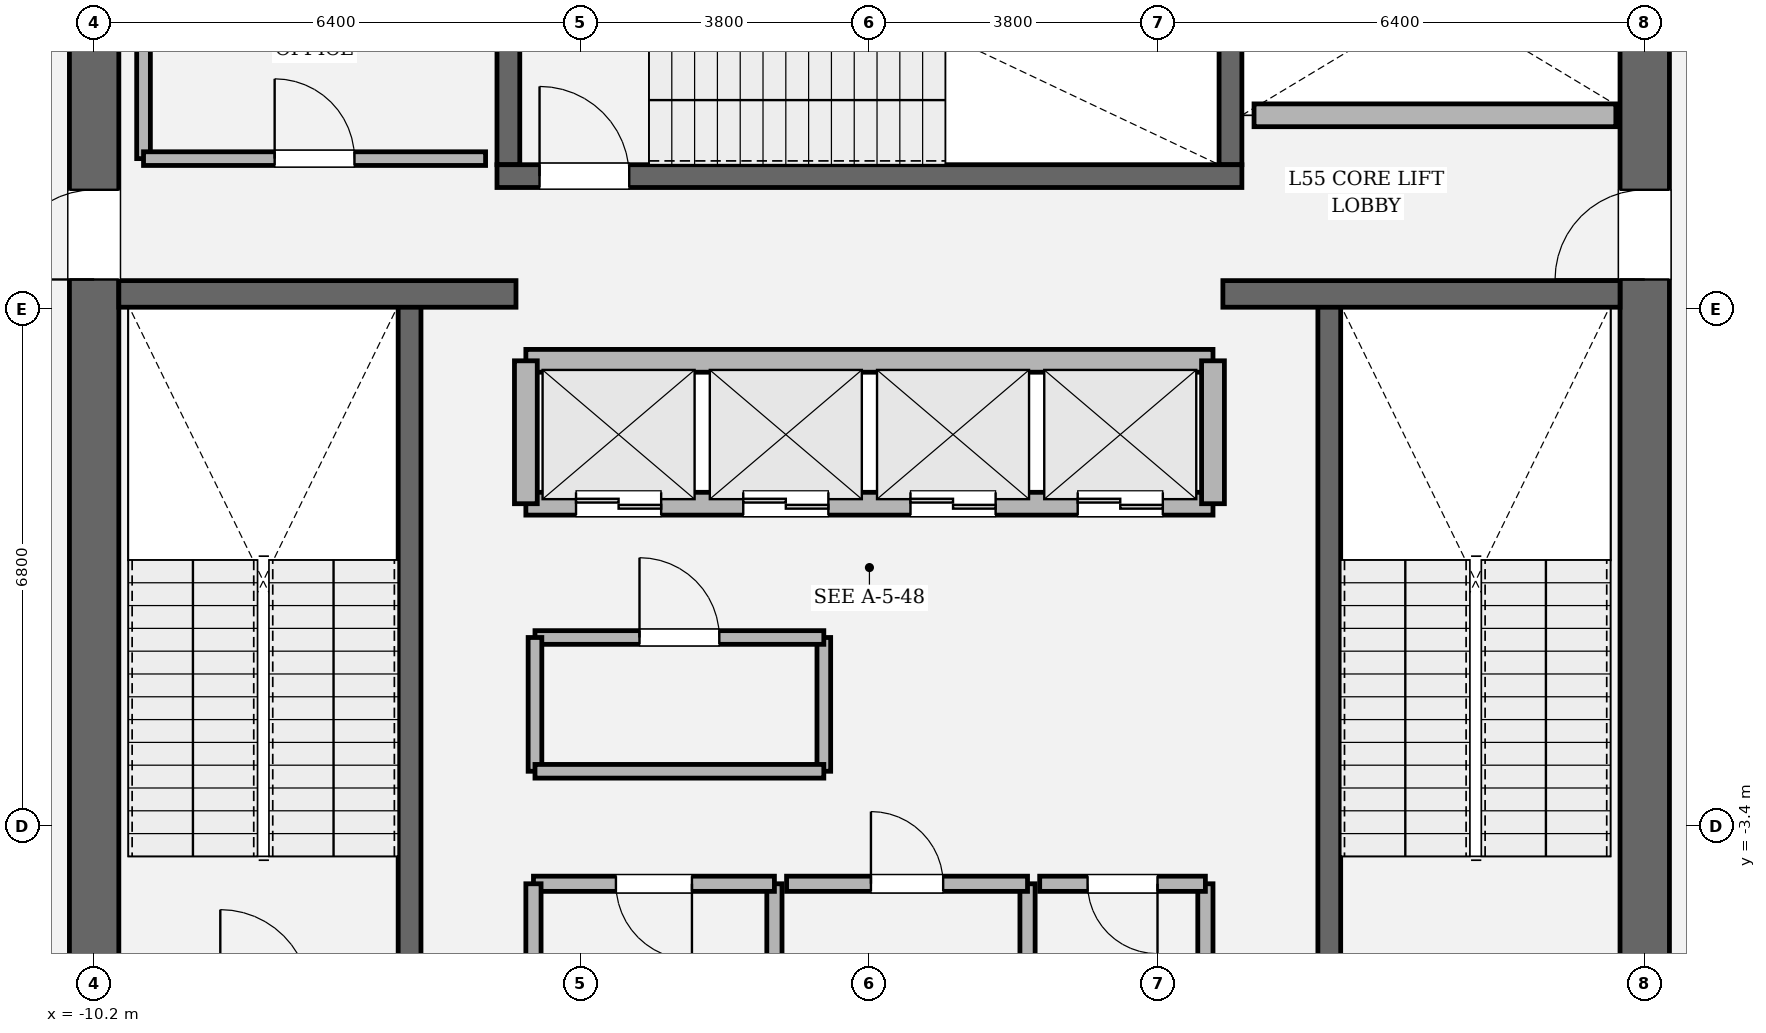
"""IFC4 building model, lengths in metres.
Left out: names, types, materials, properties, quantities, classifications, styles, units other than length and angle.
Written with IfcOpenShell. Run it as: python <this file> out.ifc"""

import sys

from ifc_helpers import new_model, si_unit, direction, frame, frame_2d, origin, place, context, subcontext, project, spatial, rectangle, extrude, element, fill, save


model = new_model("IFC4")
c1 = context("Model", 3, precision=1e-05, world=origin(), true_north=direction((0.0, 1.0)))
c2 = subcontext(c1, "Body", "Model", "MODEL_VIEW")
j1 = project(units=[si_unit("LENGTHUNIT", "METRE"), si_unit("PLANEANGLEUNIT", "RADIAN")], contexts=[c1])
p1 = place(None, origin())
s1 = spatial("IfcSite", under=j1, at=p1, CompositionType="ELEMENT")
p2 = place(p1, origin())
s2 = spatial("IfcBuilding", under=s1, at=p2, CompositionType="ELEMENT")
p3 = place(p2, frame((0.0, 0.0, 232.95)))
s3 = spatial("IfcBuildingStorey", under=s2, at=p3, CompositionType="ELEMENT", Elevation=232.95)
p4 = place(p3, frame((-10.2, -8.875, 0.0), z_axis=(0.0, 0.0, 1.0), x_axis=(0.0, 1.0, 0.0)))
e1 = element("IfcWall", 1, at=p4, inside=s3, PredefinedType="SHEAR", context=c2, shape_type="SweptSolid", body=[
    extrude(rectangle(XDim=17.75, YDim=0.65, at=frame_2d((8.875, 0.0))), origin(), (0.0, 0.0, 1.0), 4.05),
])
p5 = place(p4, frame((12.665, 0.0, 0.0)))
e2 = element("IfcOpeningElement", 2, at=p5, cuts=e1, PredefinedType="OPENING", context=c2, shape_type="SweptSolid", body=[
    extrude(rectangle(XDim=1.18, YDim=2.2, at=frame_2d((0.59, 1.1))), frame((0.0, 0.335, 0.0), z_axis=(0.0, -1.0, 0.0), x_axis=(1.0, 0.0, 0.0)), (0.0, 0.0, 1.0), 0.67),
])
p6 = place(p3, frame((10.2, 8.875, 0.0), z_axis=(0.0, 0.0, 1.0), x_axis=(0.0, -1.0, 0.0)))
e3 = element("IfcWall", 3, at=p6, inside=s3, PredefinedType="SHEAR", context=c2, shape_type="SweptSolid", body=[
    extrude(rectangle(XDim=17.75, YDim=0.65, at=frame_2d((8.875, 0.0))), origin(), (0.0, 0.0, 1.0), 4.05),
])
p7 = place(p6, frame((3.905, 0.0, 0.0)))
e4 = element("IfcOpeningElement", 4, at=p7, cuts=e3, PredefinedType="OPENING", context=c2, shape_type="SweptSolid", body=[
    extrude(rectangle(XDim=1.18, YDim=2.2, at=frame_2d((0.59, 1.1))), frame((0.0, 0.335, 0.0), z_axis=(0.0, -1.0, 0.0), x_axis=(1.0, 0.0, 0.0)), (0.0, 0.0, 1.0), 0.67),
])
for number, where, z_axis, x_axis in (
    (5, (-6.05, -5.5, 0.0), (0.0, 0.0, 1.0), (0.0, 1.0, 0.0)),
    (6, (6.05, 3.45, 0.0), (0.0, 0.0, 1.0), (0.0, -1.0, 0.0)),
):
    element("IfcWall", number, at=place(p3, frame(where, z_axis=z_axis, x_axis=x_axis)), inside=s3, PredefinedType="SOLIDWALL", context=c2, shape_type="SweptSolid", body=[
        extrude(rectangle(XDim=8.95, YDim=0.3, at=frame_2d((4.475, 0.0))), origin(), (0.0, 0.0, 1.0), 4.05),
    ])
for number, where, z_axis, x_axis in (
    (7, (-4.75, 5.3, 0.0), (0.0, 0.0, 1.0), (0.0, 1.0, 0.0)),
    (8, (4.75, 8.875, 0.0), (0.0, 0.0, 1.0), (0.0, -1.0, 0.0)),
):
    element("IfcWall", number, at=place(p3, frame(where, z_axis=z_axis, x_axis=x_axis)), inside=s3, PredefinedType="SOLIDWALL", context=c2, shape_type="SweptSolid", body=[
        extrude(rectangle(XDim=3.575, YDim=0.3, at=frame_2d((1.788, 0.0))), origin(), (0.0, 0.0, 1.0), 4.05),
    ])
p8 = place(p3, frame((-4.9, 5.15, 0.0), z_axis=(0.0, 0.0, 1.0), x_axis=(1.0, 0.0, 0.0)))
e9 = element("IfcWall", 9, at=p8, inside=s3, PredefinedType="SOLIDWALL", context=c2, shape_type="SweptSolid", body=[
    extrude(rectangle(XDim=9.8, YDim=0.3, at=frame_2d((4.9, 0.0))), origin(), (0.0, 0.0, 1.0), 4.05),
])
p9 = place(p8, frame((0.56, 0.0, 0.0)))
e10 = element("IfcOpeningElement", 10, at=p9, cuts=e9, PredefinedType="OPENING", context=c2, shape_type="SweptSolid", body=[
    extrude(rectangle(XDim=1.18, YDim=2.2, at=frame_2d((0.59, 1.1))), frame((0.0, 0.16, 0.0), z_axis=(0.0, -1.0, 0.0), x_axis=(1.0, 0.0, 0.0)), (0.0, 0.0, 1.0), 0.32),
])
for number, where, z_axis, x_axis in (
    (11, (-9.875, 3.6, 0.0), (0.0, 0.0, 1.0), (1.0, 0.0, 0.0)),
    (12, (4.65, 3.6, 0.0), (0.0, 0.0, 1.0), (1.0, 0.0, 0.0)),
):
    element("IfcWall", number, at=place(p3, frame(where, z_axis=z_axis, x_axis=x_axis)), inside=s3, PredefinedType="SOLIDWALL", context=c2, shape_type="SweptSolid", body=[
        extrude(rectangle(XDim=5.225, YDim=0.35, at=frame_2d((2.613, 0.0))), origin(), (0.0, 0.0, 1.0), 4.05),
    ])
p10 = place(p3, frame((-4.52, 0.84, 0.0), z_axis=(0.0, 0.0, 1.0), x_axis=(1.0, 0.0, 0.0)))
e13 = element("IfcWall", 13, at=p10, inside=s3, PredefinedType="SOLIDWALL", context=c2, shape_type="SweptSolid", body=[
    extrude(rectangle(XDim=9.04, YDim=0.3, at=frame_2d((4.52, 0.0))), origin(), (0.0, 0.0, 1.0), 3.73),
])
p11 = place(p10, frame((0.66, 0.0, 0.0)))
e14 = element("IfcOpeningElement", 14, at=p11, cuts=e13, PredefinedType="OPENING", context=c2, shape_type="SweptSolid", body=[
    extrude(rectangle(XDim=1.12, YDim=2.25, at=frame_2d((0.56, 1.125))), frame((0.0, 0.16, 0.0), z_axis=(0.0, -1.0, 0.0), x_axis=(1.0, 0.0, 0.0)), (0.0, 0.0, 1.0), 0.32),
])
p12 = place(p10, frame((2.86, 0.0, 0.0)))
e15 = element("IfcOpeningElement", 15, at=p12, cuts=e13, PredefinedType="OPENING", context=c2, shape_type="SweptSolid", body=[
    extrude(rectangle(XDim=1.12, YDim=2.25, at=frame_2d((0.56, 1.125))), frame((0.0, 0.16, 0.0), z_axis=(0.0, -1.0, 0.0), x_axis=(1.0, 0.0, 0.0)), (0.0, 0.0, 1.0), 0.32),
])
p13 = place(p10, frame((5.06, 0.0, 0.0)))
e16 = element("IfcOpeningElement", 16, at=p13, cuts=e13, PredefinedType="OPENING", context=c2, shape_type="SweptSolid", body=[
    extrude(rectangle(XDim=1.12, YDim=2.25, at=frame_2d((0.56, 1.125))), frame((0.0, 0.16, 0.0), z_axis=(0.0, -1.0, 0.0), x_axis=(1.0, 0.0, 0.0)), (0.0, 0.0, 1.0), 0.32),
])
p14 = place(p10, frame((7.26, 0.0, 0.0)))
e17 = element("IfcOpeningElement", 17, at=p14, cuts=e13, PredefinedType="OPENING", context=c2, shape_type="SweptSolid", body=[
    extrude(rectangle(XDim=1.12, YDim=2.25, at=frame_2d((0.56, 1.125))), frame((0.0, 0.16, 0.0), z_axis=(0.0, -1.0, 0.0), x_axis=(1.0, 0.0, 0.0)), (0.0, 0.0, 1.0), 0.32),
])
p15 = place(p3, frame((-4.52, 2.72, 0.0), z_axis=(0.0, 0.0, 1.0), x_axis=(1.0, 0.0, 0.0)))
e18 = element("IfcWall", 18, at=p15, inside=s3, PredefinedType="SOLIDWALL", context=c2, shape_type="SweptSolid", body=[
    extrude(rectangle(XDim=9.04, YDim=0.3, at=frame_2d((4.52, 0.0))), origin(), (0.0, 0.0, 1.0), 3.73),
])
for number, where, z_axis, x_axis in (
    (19, (-4.52, 0.84, 0.0), (0.0, 0.0, 1.0), (0.0, 1.0, 0.0)),
    (20, (4.52, 0.84, 0.0), (0.0, 0.0, 1.0), (0.0, 1.0, 0.0)),
):
    element("IfcWall", number, at=place(p3, frame(where, z_axis=z_axis, x_axis=x_axis)), inside=s3, PredefinedType="SOLIDWALL", context=c2, shape_type="SweptSolid", body=[
        extrude(rectangle(XDim=1.88, YDim=0.3, at=frame_2d((0.94, 0.0))), origin(), (0.0, 0.0, 1.0), 3.73),
    ])
p16 = place(p3, frame((5.06, 5.95, 0.0), z_axis=(0.0, 0.0, 1.0), x_axis=(1.0, 0.0, 0.0)))
e21 = element("IfcWall", 21, at=p16, inside=s3, PredefinedType="SOLIDWALL", context=c2, shape_type="SweptSolid", body=[
    extrude(rectangle(XDim=4.76, YDim=0.3, at=frame_2d((2.38, 0.0))), origin(), (0.0, 0.0, 1.0), 3.73),
])
p17 = place(p3, frame((-1.25, -5.9, 0.0), z_axis=(0.0, 0.0, 1.0), x_axis=(0.0, 1.0, 0.0)))
e22 = element("IfcWall", 22, at=p17, inside=s3, PredefinedType="SOLIDWALL", context=c2, shape_type="SweptSolid", body=[
    extrude(rectangle(XDim=1.74, YDim=0.2, at=frame_2d((0.87, 0.0))), origin(), (0.0, 0.0, 1.0), 3.73),
])
p18 = place(p3, frame((-1.25, -4.16, 0.0), z_axis=(0.0, 0.0, 1.0), x_axis=(-1.0, 0.0, 0.0)))
e23 = element("IfcWall", 23, at=p18, inside=s3, PredefinedType="SOLIDWALL", context=c2, shape_type="SweptSolid", body=[
    extrude(rectangle(XDim=3.17, YDim=0.2, at=frame_2d((1.585, 0.0))), origin(), (0.0, 0.0, 1.0), 3.73),
])
p19 = place(p18, frame((1.085, 0.0, 0.0)))
e24 = element("IfcOpeningElement", 24, at=p19, cuts=e23, PredefinedType="OPENING", context=c2, shape_type="SweptSolid", body=[
    extrude(rectangle(XDim=1.0, YDim=2.15, at=frame_2d((0.5, 1.075))), frame((0.0, 0.11, 0.0), z_axis=(0.0, -1.0, 0.0), x_axis=(1.0, 0.0, 0.0)), (0.0, 0.0, 1.0), 0.22),
])
for number, where, z_axis, x_axis in (
    (25, (-4.42, -4.16, 0.0), (0.0, 0.0, 1.0), (0.0, -1.0, 0.0)),
    (26, (2.08, -5.9, 0.0), (0.0, 0.0, 1.0), (0.0, 1.0, 0.0)),
):
    element("IfcWall", number, at=place(p3, frame(where, z_axis=z_axis, x_axis=x_axis)), inside=s3, PredefinedType="SOLIDWALL", context=c2, shape_type="SweptSolid", body=[
        extrude(rectangle(XDim=1.74, YDim=0.2, at=frame_2d((0.87, 0.0))), origin(), (0.0, 0.0, 1.0), 3.73),
    ])
p20 = place(p3, frame((2.08, -4.16, 0.0), z_axis=(0.0, 0.0, 1.0), x_axis=(-1.0, 0.0, 0.0)))
e27 = element("IfcWall", 27, at=p20, inside=s3, PredefinedType="SOLIDWALL", context=c2, shape_type="SweptSolid", body=[
    extrude(rectangle(XDim=3.17, YDim=0.2, at=frame_2d((1.585, 0.0))), origin(), (0.0, 0.0, 1.0), 3.73),
])
p21 = place(p20, frame((1.11, 0.0, 0.0)))
e28 = element("IfcOpeningElement", 28, at=p21, cuts=e27, PredefinedType="OPENING", context=c2, shape_type="SweptSolid", body=[
    extrude(rectangle(XDim=0.95, YDim=2.15, at=frame_2d((0.475, 1.075))), frame((0.0, 0.11, 0.0), z_axis=(0.0, -1.0, 0.0), x_axis=(1.0, 0.0, 0.0)), (0.0, 0.0, 1.0), 0.22),
])
p22 = place(p3, frame((4.42, -5.9, 0.0), z_axis=(0.0, 0.0, 1.0), x_axis=(0.0, 1.0, 0.0)))
e29 = element("IfcWall", 29, at=p22, inside=s3, PredefinedType="SOLIDWALL", context=c2, shape_type="SweptSolid", body=[
    extrude(rectangle(XDim=1.74, YDim=0.2, at=frame_2d((0.87, 0.0))), origin(), (0.0, 0.0, 1.0), 3.73),
])
p23 = place(p3, frame((4.42, -4.16, 0.0), z_axis=(0.0, 0.0, 1.0), x_axis=(-1.0, 0.0, 0.0)))
e30 = element("IfcWall", 30, at=p23, inside=s3, PredefinedType="SOLIDWALL", context=c2, shape_type="SweptSolid", body=[
    extrude(rectangle(XDim=2.18, YDim=0.2, at=frame_2d((1.09, 0.0))), origin(), (0.0, 0.0, 1.0), 3.73),
])
p24 = place(p23, frame((0.63, 0.0, 0.0)))
e31 = element("IfcOpeningElement", 31, at=p24, cuts=e30, PredefinedType="OPENING", context=c2, shape_type="SweptSolid", body=[
    extrude(rectangle(XDim=0.92, YDim=2.1, at=frame_2d((0.46, 1.05))), frame((0.0, 0.11, 0.0), z_axis=(0.0, -1.0, 0.0), x_axis=(1.0, 0.0, 0.0)), (0.0, 0.0, 1.0), 0.22),
])
p25 = place(p3, frame((-0.6, -2.68, 0.0), z_axis=(0.0, 0.0, 1.0), x_axis=(0.0, 1.0, 0.0)))
e32 = element("IfcWall", 32, at=p25, inside=s3, PredefinedType="PARTITIONING", context=c2, shape_type="SweptSolid", body=[
    extrude(rectangle(XDim=1.76, YDim=0.18, at=frame_2d((0.88, 0.0))), origin(), (0.0, 0.0, 1.0), 3.73),
])
p26 = place(p3, frame((-0.6, -0.92, 0.0), z_axis=(0.0, 0.0, 1.0), x_axis=(-1.0, 0.0, 0.0)))
e33 = element("IfcWall", 33, at=p26, inside=s3, PredefinedType="PARTITIONING", context=c2, shape_type="SweptSolid", body=[
    extrude(rectangle(XDim=3.8, YDim=0.18, at=frame_2d((1.9, 0.0))), origin(), (0.0, 0.0, 1.0), 3.73),
])
p27 = place(p26, frame((1.375, 0.0, 0.0)))
e34 = element("IfcOpeningElement", 34, at=p27, cuts=e33, PredefinedType="OPENING", context=c2, shape_type="SweptSolid", body=[
    extrude(rectangle(XDim=1.05, YDim=2.2, at=frame_2d((0.525, 1.1))), frame((0.0, 0.1, 0.0), z_axis=(0.0, -1.0, 0.0), x_axis=(1.0, 0.0, 0.0)), (0.0, 0.0, 1.0), 0.2),
])
p28 = place(p3, frame((-4.4, -0.92, 0.0), z_axis=(0.0, 0.0, 1.0), x_axis=(0.0, -1.0, 0.0)))
e35 = element("IfcWall", 35, at=p28, inside=s3, PredefinedType="PARTITIONING", context=c2, shape_type="SweptSolid", body=[
    extrude(rectangle(XDim=1.76, YDim=0.18, at=frame_2d((0.88, 0.0))), origin(), (0.0, 0.0, 1.0), 3.73),
])
p29 = place(p3, frame((-4.4, -2.68, 0.0), z_axis=(0.0, 0.0, 1.0), x_axis=(1.0, 0.0, 0.0)))
e36 = element("IfcWall", 36, at=p29, inside=s3, PredefinedType="PARTITIONING", context=c2, shape_type="SweptSolid", body=[
    extrude(rectangle(XDim=3.8, YDim=0.18, at=frame_2d((1.9, 0.0))), origin(), (0.0, 0.0, 1.0), 3.73),
])
p30 = place(p3, frame((-9.55, 8.65, 0.0), z_axis=(0.0, 0.0, 1.0), x_axis=(0.0, -1.0, 0.0)))
e37 = element("IfcWall", 37, at=p30, inside=s3, PredefinedType="PARTITIONING", context=c2, shape_type="SweptSolid", body=[
    extrude(rectangle(XDim=3.27, YDim=0.18, at=frame_2d((1.635, 0.0))), origin(), (0.0, 0.0, 1.0), 3.73),
])
p31 = place(p3, frame((-9.55, 5.38, 0.0), z_axis=(0.0, 0.0, 1.0), x_axis=(1.0, 0.0, 0.0)))
e38 = element("IfcWall", 38, at=p31, inside=s3, PredefinedType="PARTITIONING", context=c2, shape_type="SweptSolid", body=[
    extrude(rectangle(XDim=4.5, YDim=0.18, at=frame_2d((2.25, 0.0))), origin(), (0.0, 0.0, 1.0), 3.73),
])
p32 = place(p31, frame((1.725, 0.0, 0.0)))
e39 = element("IfcOpeningElement", 39, at=p32, cuts=e38, PredefinedType="OPENING", context=c2, shape_type="SweptSolid", body=[
    extrude(rectangle(XDim=1.05, YDim=2.2, at=frame_2d((0.525, 1.1))), frame((0.0, 0.1, 0.0), z_axis=(0.0, -1.0, 0.0), x_axis=(1.0, 0.0, 0.0)), (0.0, 0.0, 1.0), 0.2),
])
p33 = place(p9, origin())
e40 = element("IfcDoor", 40, at=p33, inside=s3, OperationType="SINGLE_SWING_LEFT", PredefinedType="DOOR", context=c2, shape_type="SweptSolid", body=[
    extrude(rectangle(XDim=1.18, YDim=2.2, at=frame_2d((0.59, 1.1))), frame((0.0, 0.025, 0.0), z_axis=(0.0, -1.0, 0.0), x_axis=(1.0, 0.0, 0.0)), (0.0, 0.0, 1.0), 0.05),
])
fill(e10, e40)
p34 = place(p5, origin())
e41 = element("IfcDoor", 41, at=p34, inside=s3, OperationType="SINGLE_SWING_LEFT", PredefinedType="DOOR", context=c2, shape_type="SweptSolid", body=[
    extrude(rectangle(XDim=1.18, YDim=2.2, at=frame_2d((0.59, 1.1))), frame((0.0, 0.025, 0.0), z_axis=(0.0, -1.0, 0.0), x_axis=(1.0, 0.0, 0.0)), (0.0, 0.0, 1.0), 0.05),
])
fill(e2, e41)
p35 = place(p7, origin())
e42 = element("IfcDoor", 42, at=p35, inside=s3, OperationType="SINGLE_SWING_RIGHT", PredefinedType="DOOR", context=c2, shape_type="SweptSolid", body=[
    extrude(rectangle(XDim=1.18, YDim=2.2, at=frame_2d((0.59, 1.1))), frame((0.0, 0.025, 0.0), z_axis=(0.0, -1.0, 0.0), x_axis=(1.0, 0.0, 0.0)), (0.0, 0.0, 1.0), 0.05),
])
fill(e4, e42)
p36 = place(p11, origin())
e43 = element("IfcDoor", 43, at=p36, inside=s3, OperationType="DOUBLE_DOOR_SLIDING", PredefinedType="DOOR", context=c2, shape_type="SweptSolid", body=[
    extrude(rectangle(XDim=1.12, YDim=2.25, at=frame_2d((0.56, 1.125))), frame((0.0, 0.025, 0.0), z_axis=(0.0, -1.0, 0.0), x_axis=(1.0, 0.0, 0.0)), (0.0, 0.0, 1.0), 0.05),
])
fill(e14, e43)
p37 = place(p12, origin())
e44 = element("IfcDoor", 44, at=p37, inside=s3, OperationType="DOUBLE_DOOR_SLIDING", PredefinedType="DOOR", context=c2, shape_type="SweptSolid", body=[
    extrude(rectangle(XDim=1.12, YDim=2.25, at=frame_2d((0.56, 1.125))), frame((0.0, 0.025, 0.0), z_axis=(0.0, -1.0, 0.0), x_axis=(1.0, 0.0, 0.0)), (0.0, 0.0, 1.0), 0.05),
])
fill(e15, e44)
p38 = place(p13, origin())
e45 = element("IfcDoor", 45, at=p38, inside=s3, OperationType="DOUBLE_DOOR_SLIDING", PredefinedType="DOOR", context=c2, shape_type="SweptSolid", body=[
    extrude(rectangle(XDim=1.12, YDim=2.25, at=frame_2d((0.56, 1.125))), frame((0.0, 0.025, 0.0), z_axis=(0.0, -1.0, 0.0), x_axis=(1.0, 0.0, 0.0)), (0.0, 0.0, 1.0), 0.05),
])
fill(e16, e45)
p39 = place(p14, origin())
e46 = element("IfcDoor", 46, at=p39, inside=s3, OperationType="DOUBLE_DOOR_SLIDING", PredefinedType="DOOR", context=c2, shape_type="SweptSolid", body=[
    extrude(rectangle(XDim=1.12, YDim=2.25, at=frame_2d((0.56, 1.125))), frame((0.0, 0.025, 0.0), z_axis=(0.0, -1.0, 0.0), x_axis=(1.0, 0.0, 0.0)), (0.0, 0.0, 1.0), 0.05),
])
fill(e17, e46)
p40 = place(p19, origin())
e47 = element("IfcDoor", 47, at=p40, inside=s3, OperationType="SINGLE_SWING_LEFT", PredefinedType="DOOR", context=c2, shape_type="SweptSolid", body=[
    extrude(rectangle(XDim=1.0, YDim=2.15, at=frame_2d((0.5, 1.075))), frame((0.0, 0.025, 0.0), z_axis=(0.0, -1.0, 0.0), x_axis=(1.0, 0.0, 0.0)), (0.0, 0.0, 1.0), 0.05),
])
fill(e24, e47)
p41 = place(p21, origin())
e48 = element("IfcDoor", 48, at=p41, inside=s3, OperationType="SINGLE_SWING_RIGHT", PredefinedType="DOOR", context=c2, shape_type="SweptSolid", body=[
    extrude(rectangle(XDim=0.95, YDim=2.15, at=frame_2d((0.475, 1.075))), frame((0.0, 0.025, 0.0), z_axis=(0.0, -1.0, 0.0), x_axis=(1.0, 0.0, 0.0)), (0.0, 0.0, 1.0), 0.05),
])
fill(e28, e48)
p42 = place(p24, origin())
e49 = element("IfcDoor", 49, at=p42, inside=s3, OperationType="SINGLE_SWING_LEFT", PredefinedType="DOOR", context=c2, shape_type="SweptSolid", body=[
    extrude(rectangle(XDim=0.92, YDim=2.1, at=frame_2d((0.46, 1.05))), frame((0.0, 0.025, 0.0), z_axis=(0.0, -1.0, 0.0), x_axis=(1.0, 0.0, 0.0)), (0.0, 0.0, 1.0), 0.05),
])
fill(e31, e49)
p43 = place(p27, origin())
e50 = element("IfcDoor", 50, at=p43, inside=s3, OperationType="SINGLE_SWING_RIGHT", PredefinedType="DOOR", context=c2, shape_type="SweptSolid", body=[
    extrude(rectangle(XDim=1.05, YDim=2.2, at=frame_2d((0.525, 1.1))), frame((0.0, 0.025, 0.0), z_axis=(0.0, -1.0, 0.0), x_axis=(1.0, 0.0, 0.0)), (0.0, 0.0, 1.0), 0.05),
])
fill(e34, e50)
p44 = place(p32, origin())
e51 = element("IfcDoor", 51, at=p44, inside=s3, OperationType="SINGLE_SWING_LEFT", PredefinedType="DOOR", context=c2, shape_type="SweptSolid", body=[
    extrude(rectangle(XDim=1.05, YDim=2.2, at=frame_2d((0.525, 1.1))), frame((0.0, 0.025, 0.0), z_axis=(0.0, -1.0, 0.0), x_axis=(1.0, 0.0, 0.0)), (0.0, 0.0, 1.0), 0.05),
])
fill(e39, e51)
save(model, sys.argv[1])
